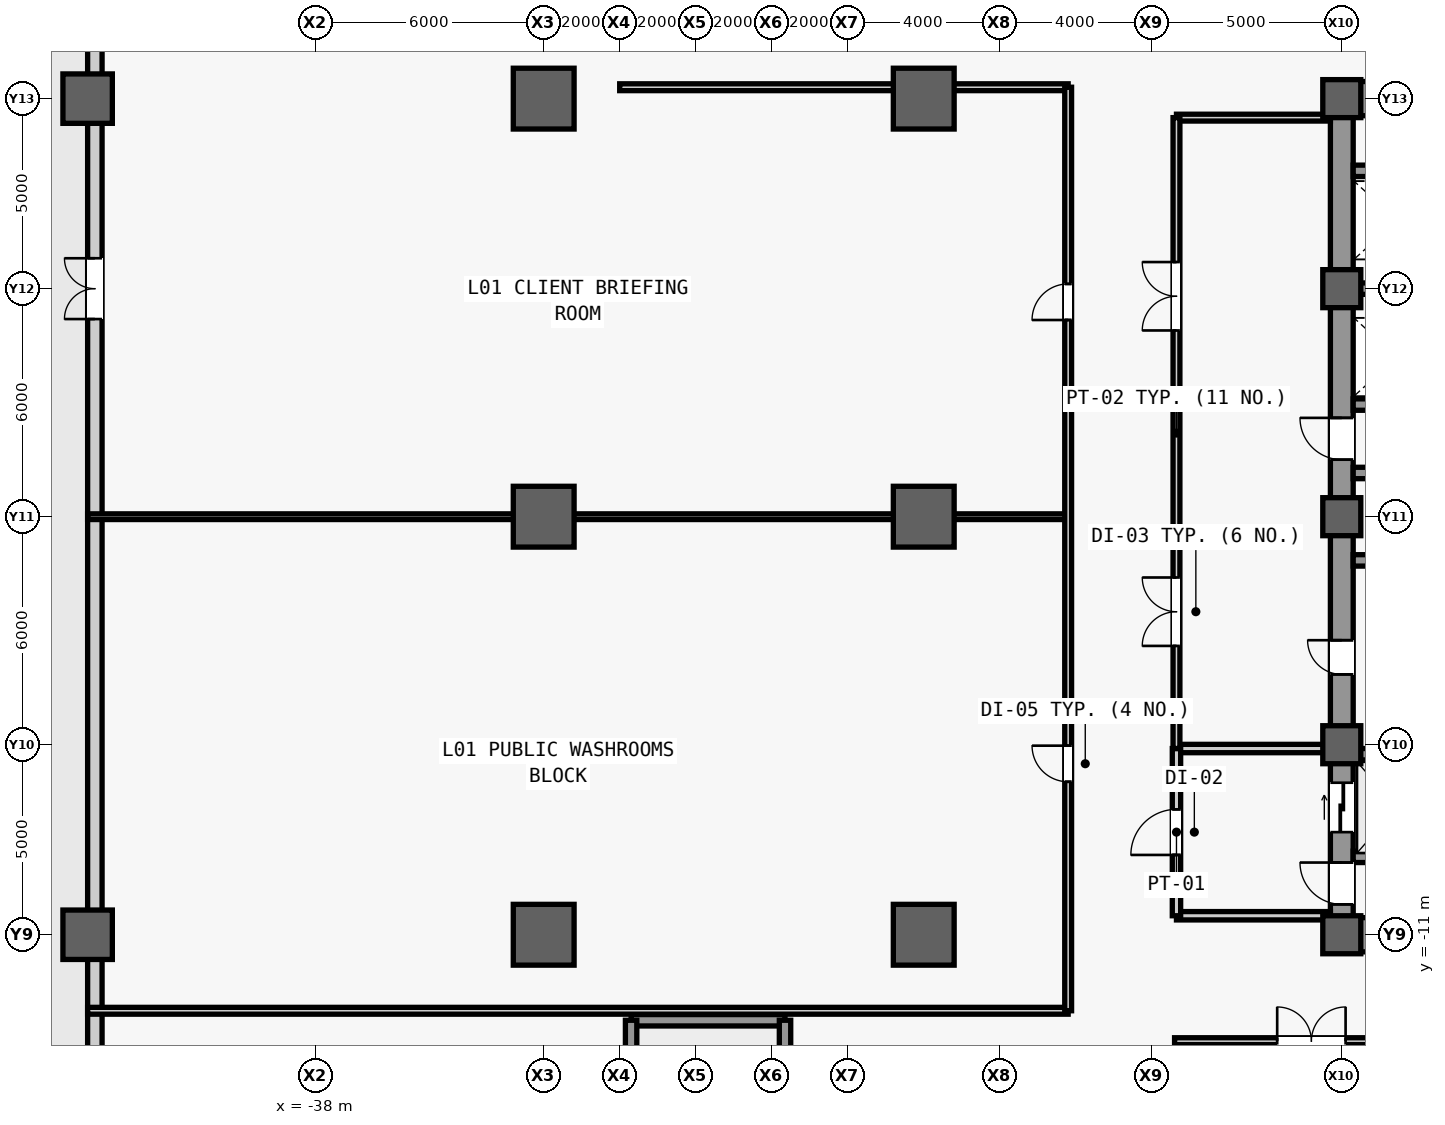
"""IFC4 building model, lengths in metres.
Left out: names, types, materials, properties, quantities, classifications, styles, units other than length and angle.
Written with IfcOpenShell. Run it as: python <this file> out.ifc"""

import sys

from ifc_helpers import new_model, si_unit, direction, frame, frame_2d, origin, origin_2d, place, context, subcontext, project, spatial, rectangle, extrude, source, transform, mapped, element, fill, save


model = new_model("IFC4")
c1 = context("Model", 3, precision=1e-05, world=origin(), true_north=direction((0.0, 1.0)))
c2 = subcontext(c1, "Body", "Model", "MODEL_VIEW")
j1 = project(units=[si_unit("LENGTHUNIT", "METRE"), si_unit("PLANEANGLEUNIT", "RADIAN")], contexts=[c1])
p1 = place(None, origin())
s1 = spatial("IfcSite", under=j1, at=p1, CompositionType="ELEMENT")
p2 = place(p1, origin())
s2 = spatial("IfcBuilding", under=s1, at=p2, CompositionType="ELEMENT")
p3 = place(p2, frame((0.0, 0.0, 6.6)))
s3 = spatial("IfcBuildingStorey", under=s2, at=p3, CompositionType="ELEMENT", Elevation=6.6)
m1 = source(origin(), c2, "Body", "SweptSolid", [
    extrude(rectangle(XDim=22.0, YDim=0.6, at=frame_2d((11.0, 0.0))), origin(), (0.0, 0.0, 1.0), 5.08),
])
p4 = place(p3, frame((-11.0, -11.0, 0.0), z_axis=(0.0, 0.0, 1.0), x_axis=(0.0, 1.0, 0.0)))
e1 = element("IfcWall", 1, at=p4, inside=s3, PredefinedType="SHEAR", context=c2, shape_type="MappedRepresentation", body=[
    mapped(m1, transform((0.0, 0.0, 0.0), scale=1.0)),
])
m2 = source(origin(), c2, "Body", "SweptSolid", [
    extrude(rectangle(XDim=1.1, YDim=2.2, at=frame_2d((0.55, 1.1))), frame((0.0, 0.31, 0.0), z_axis=(0.0, -1.0, 0.0), x_axis=(1.0, 0.0, 0.0)), (0.0, 0.0, 1.0), 0.62),
])
p5 = place(p4, frame((0.8, 0.0, 0.0)))
e2 = element("IfcOpeningElement", 2, at=p5, cuts=e1, PredefinedType="OPENING", context=c2, shape_type="MappedRepresentation", body=[
    mapped(m2, transform((0.0, 0.0, 0.0), scale=1.0)),
])
p6 = place(p4, frame((12.5, 0.0, 0.0)))
e3 = element("IfcOpeningElement", 3, at=p6, cuts=e1, PredefinedType="OPENING", context=c2, shape_type="MappedRepresentation", body=[
    mapped(m2, transform((0.0, 0.0, 0.0), scale=1.0)),
])
m3 = source(origin(), c2, "Body", "SweptSolid", [
    extrude(rectangle(XDim=0.9, YDim=2.15, at=frame_2d((0.45, 1.075))), frame((0.0, 0.31, 0.0), z_axis=(0.0, -1.0, 0.0), x_axis=(1.0, 0.0, 0.0)), (0.0, 0.0, 1.0), 0.62),
])
p7 = place(p4, frame((6.85, 0.0, 0.0)))
e4 = element("IfcOpeningElement", 4, at=p7, cuts=e1, PredefinedType="OPENING", context=c2, shape_type="MappedRepresentation", body=[
    mapped(m3, transform((0.0, 0.0, 0.0), scale=1.0)),
])
m4 = source(origin(), c2, "Body", "SweptSolid", [
    extrude(rectangle(XDim=1.3, YDim=2.3, at=frame_2d((0.65, 1.15))), frame((0.0, 0.31, 0.0), z_axis=(0.0, -1.0, 0.0), x_axis=(1.0, 0.0, 0.0)), (0.0, 0.0, 1.0), 0.62),
])
p8 = place(p4, frame((2.7, 0.0, 0.0)))
e5 = element("IfcOpeningElement", 5, at=p8, cuts=e1, PredefinedType="OPENING", context=c2, shape_type="MappedRepresentation", body=[
    mapped(m4, transform((0.0, 0.0, 0.0), scale=1.0)),
])
m5 = source(origin(), c2, "Body", "SweptSolid", [
    extrude(rectangle(XDim=5.85, YDim=0.9, at=frame_2d((2.925, 0.0))), origin(), (0.0, 0.0, 1.0), 5.08),
])
for number, where, z_axis, x_axis in (
    (6, (-10.7, -11.0, 0.0), (0.0, 0.0, 1.0), (1.0, 0.0, 0.0)),
    (7, (-10.7, 11.0, 0.0), (0.0, 0.0, 1.0), (1.0, 0.0, 0.0)),
):
    element("IfcWall", number, at=place(p3, frame(where, z_axis=z_axis, x_axis=x_axis)), inside=s3, PredefinedType="SHEAR", context=c2, shape_type="MappedRepresentation", body=[
        mapped(m5, transform((0.0, 0.0, 0.0), scale=1.0)),
    ])
m6 = source(origin(), c2, "Body", "SweptSolid", [
    extrude(rectangle(XDim=5.6, YDim=0.3, at=frame_2d((2.8, 0.0))), origin(), (0.0, 0.0, 1.0), 5.08),
])
for number, where, z_axis, x_axis in (
    (8, (-10.7, -1.15, 0.0), (0.0, 0.0, 1.0), (1.0, 0.0, 0.0)),
    (9, (-10.7, 1.15, 0.0), (0.0, 0.0, 1.0), (1.0, 0.0, 0.0)),
):
    element("IfcWall", number, at=place(p3, frame(where, z_axis=z_axis, x_axis=x_axis)), inside=s3, PredefinedType="SHEAR", context=c2, shape_type="MappedRepresentation", body=[
        mapped(m6, transform((0.0, 0.0, 0.0), scale=1.0)),
    ])
m7 = source(origin(), c2, "Body", "SweptSolid", [
    extrude(rectangle(XDim=1.3, YDim=1.3, at=origin_2d()), origin(), (0.0, 0.0, 1.0), 5.4),
])
for number, where, z_axis, x_axis in (
    (10, (-44.0, -11.0, 0.0), (0.0, 0.0, 1.0), (1.0, 0.0, 0.0)),
    (11, (-44.0, 11.0, 0.0), (0.0, 0.0, 1.0), (1.0, 0.0, 0.0)),
):
    element("IfcColumn", number, at=place(p3, frame(where, z_axis=z_axis, x_axis=x_axis)), inside=s3, PredefinedType="COLUMN", context=c2, shape_type="MappedRepresentation", body=[
        mapped(m7, transform((0.0, 0.0, 0.0), scale=1.0)),
    ])
m8 = source(origin(), c2, "Body", "SweptSolid", [
    extrude(rectangle(XDim=1.6, YDim=1.6, at=origin_2d()), origin(), (0.0, 0.0, 1.0), 5.4),
])
for number, where, z_axis, x_axis in (
    (12, (-32.0, -11.0, 0.0), (0.0, 0.0, 1.0), (1.0, 0.0, 0.0)),
    (13, (-32.0, 0.0, 0.0), (0.0, 0.0, 1.0), (1.0, 0.0, 0.0)),
    (14, (-32.0, 11.0, 0.0), (0.0, 0.0, 1.0), (1.0, 0.0, 0.0)),
    (15, (-22.0, -11.0, 0.0), (0.0, 0.0, 1.0), (1.0, 0.0, 0.0)),
    (16, (-22.0, 0.0, 0.0), (0.0, 0.0, 1.0), (1.0, 0.0, 0.0)),
    (17, (-22.0, 11.0, 0.0), (0.0, 0.0, 1.0), (1.0, 0.0, 0.0)),
):
    element("IfcColumn", number, at=place(p3, frame(where, z_axis=z_axis, x_axis=x_axis)), inside=s3, PredefinedType="COLUMN", context=c2, shape_type="MappedRepresentation", body=[
        mapped(m8, transform((0.0, 0.0, 0.0), scale=1.0)),
    ])
m9 = source(origin(), c2, "Body", "SweptSolid", [
    extrude(rectangle(XDim=1.0, YDim=1.0, at=origin_2d()), origin(), (0.0, 0.0, 1.0), 5.4),
])
for number, where, z_axis, x_axis in (
    (18, (-11.0, -11.0, 0.0), (0.0, 0.0, 1.0), (1.0, 0.0, 0.0)),
    (19, (-11.0, -6.0, 0.0), (0.0, 0.0, 1.0), (1.0, 0.0, 0.0)),
    (20, (-11.0, 0.0, 0.0), (0.0, 0.0, 1.0), (1.0, 0.0, 0.0)),
    (21, (-11.0, 6.0, 0.0), (0.0, 0.0, 1.0), (1.0, 0.0, 0.0)),
    (22, (-11.0, 11.0, 0.0), (0.0, 0.0, 1.0), (1.0, 0.0, 0.0)),
):
    element("IfcColumn", number, at=place(p3, frame(where, z_axis=z_axis, x_axis=x_axis)), inside=s3, PredefinedType="COLUMN", context=c2, shape_type="MappedRepresentation", body=[
        mapped(m9, transform((0.0, 0.0, 0.0), scale=1.0)),
    ])
m10 = source(origin(), c2, "Body", "SweptSolid", [
    extrude(rectangle(XDim=73.24, YDim=0.38, at=frame_2d((36.62, 0.0))), origin(), (0.0, 0.0, 1.0), 3.28),
])
p9 = place(p3, frame((-43.81, -36.62, 0.0), z_axis=(0.0, 0.0, 1.0), x_axis=(0.0, 1.0, 0.0)))
e23 = element("IfcWall", 23, at=p9, inside=s3, PredefinedType="STANDARD", context=c2, shape_type="MappedRepresentation", body=[
    mapped(m10, transform((0.0, 0.0, 0.0), scale=1.0)),
])
m11 = source(origin(), c2, "Body", "SweptSolid", [
    extrude(rectangle(XDim=1.6, YDim=2.25, at=frame_2d((0.8, 1.125))), frame((0.0, 0.2, 0.0), z_axis=(0.0, -1.0, 0.0), x_axis=(1.0, 0.0, 0.0)), (0.0, 0.0, 1.0), 0.4),
])
p10 = place(p9, frame((41.82, 0.0, 0.0)))
e24 = element("IfcOpeningElement", 24, at=p10, cuts=e23, PredefinedType="OPENING", context=c2, shape_type="MappedRepresentation", body=[
    mapped(m11, transform((0.0, 0.0, 0.0), scale=1.0)),
])
m12 = source(origin(), c2, "Body", "SweptSolid", [
    extrude(rectangle(XDim=2.4, YDim=2.56, at=frame_2d((1.2, 1.28))), frame((0.0, 0.2, 0.0), z_axis=(0.0, -1.0, 0.0), x_axis=(1.0, 0.0, 0.0)), (0.0, 0.0, 1.0), 0.4),
])
p11 = place(p9, frame((17.11, 0.0, 0.5)))
e25 = element("IfcOpeningElement", 25, at=p11, cuts=e23, PredefinedType="OPENING", context=c2, shape_type="MappedRepresentation", body=[
    mapped(m12, transform((0.0, 0.0, 0.0), scale=1.0)),
])
p12 = place(p9, frame((53.73, 0.0, 0.5)))
e26 = element("IfcOpeningElement", 26, at=p12, cuts=e23, PredefinedType="OPENING", context=c2, shape_type="MappedRepresentation", body=[
    mapped(m12, transform((0.0, 0.0, 0.0), scale=1.0)),
])
m13 = source(origin(), c2, "Body", "SweptSolid", [
    extrude(rectangle(XDim=2.2, YDim=0.3, at=frame_2d((1.1, 0.0))), origin(), (0.0, 0.0, 1.0), 5.08),
])
for number, where, z_axis, x_axis in (
    (27, (-10.7, -8.95, 0.0), (0.0, 0.0, 1.0), (1.0, 0.0, 0.0)),
    (28, (-10.7, -6.25, 0.0), (0.0, 0.0, 1.0), (1.0, 0.0, 0.0)),
    (29, (-10.7, 2.95, 0.0), (0.0, 0.0, 1.0), (1.0, 0.0, 0.0)),
    (30, (-10.7, 6.0, 0.0), (0.0, 0.0, 1.0), (1.0, 0.0, 0.0)),
    (31, (-10.7, 9.1, 0.0), (0.0, 0.0, 1.0), (1.0, 0.0, 0.0)),
):
    element("IfcWall", number, at=place(p3, frame(where, z_axis=z_axis, x_axis=x_axis)), inside=s3, PredefinedType="SHEAR", context=c2, shape_type="MappedRepresentation", body=[
        mapped(m13, transform((0.0, 0.0, 0.0), scale=1.0)),
    ])
m14 = source(origin(), c2, "Body", "SweptSolid", [
    extrude(rectangle(XDim=4.05, YDim=0.22, at=frame_2d((2.025, 0.0))), origin(), (0.0, 0.0, 1.0), 5.08),
])
for number, where, z_axis, x_axis in (
    (32, (-15.35, -10.5, 0.0), (0.0, 0.0, 1.0), (1.0, 0.0, 0.0)),
    (33, (-15.35, -6.1, 0.0), (0.0, 0.0, 1.0), (1.0, 0.0, 0.0)),
):
    element("IfcWall", number, at=place(p3, frame(where, z_axis=z_axis, x_axis=x_axis)), inside=s3, PredefinedType="PARTITIONING", context=c2, shape_type="MappedRepresentation", body=[
        mapped(m14, transform((0.0, 0.0, 0.0), scale=1.0)),
    ])
m15 = source(origin(), c2, "Body", "SweptSolid", [
    extrude(rectangle(XDim=4.4, YDim=0.22, at=frame_2d((2.2, 0.0))), origin(), (0.0, 0.0, 1.0), 5.08),
])
p13 = place(p3, frame((-15.35, -10.5, 0.0), z_axis=(0.0, 0.0, 1.0), x_axis=(0.0, 1.0, 0.0)))
e34 = element("IfcWall", 34, at=p13, inside=s3, PredefinedType="PARTITIONING", context=c2, shape_type="MappedRepresentation", body=[
    mapped(m15, transform((0.0, 0.0, 0.0), scale=1.0)),
])
m16 = source(origin(), c2, "Body", "SweptSolid", [
    extrude(rectangle(XDim=1.2, YDim=2.2, at=frame_2d((0.6, 1.1))), frame((0.0, 0.12, 0.0), z_axis=(0.0, -1.0, 0.0), x_axis=(1.0, 0.0, 0.0)), (0.0, 0.0, 1.0), 0.24),
])
p14 = place(p13, frame((1.6, 0.0, 0.0)))
e35 = element("IfcOpeningElement", 35, at=p14, cuts=e34, PredefinedType="OPENING", context=c2, shape_type="MappedRepresentation", body=[
    mapped(m16, transform((0.0, 0.0, 0.0), scale=1.0)),
])
m17 = source(origin(), c2, "Body", "SweptSolid", [
    extrude(rectangle(XDim=4.05, YDim=0.18, at=frame_2d((2.025, 0.0))), origin(), (0.0, 0.0, 1.0), 5.08),
])
p15 = place(p3, frame((-15.35, 10.5, 0.0), z_axis=(0.0, 0.0, 1.0), x_axis=(1.0, 0.0, 0.0)))
e36 = element("IfcWall", 36, at=p15, inside=s3, PredefinedType="PARTITIONING", context=c2, shape_type="MappedRepresentation", body=[
    mapped(m17, transform((0.0, 0.0, 0.0), scale=1.0)),
])
m18 = source(origin(), c2, "Body", "SweptSolid", [
    extrude(rectangle(XDim=16.6, YDim=0.18, at=frame_2d((8.3, 0.0))), origin(), (0.0, 0.0, 1.0), 5.08),
])
p16 = place(p3, frame((-15.35, -6.1, 0.0), z_axis=(0.0, 0.0, 1.0), x_axis=(0.0, 1.0, 0.0)))
e37 = element("IfcWall", 37, at=p16, inside=s3, PredefinedType="PARTITIONING", context=c2, shape_type="MappedRepresentation", body=[
    mapped(m18, transform((0.0, 0.0, 0.0), scale=1.0)),
])
m19 = source(origin(), c2, "Body", "SweptSolid", [
    extrude(rectangle(XDim=1.8, YDim=2.25, at=frame_2d((0.9, 1.125))), frame((0.0, 0.1, 0.0), z_axis=(0.0, -1.0, 0.0), x_axis=(1.0, 0.0, 0.0)), (0.0, 0.0, 1.0), 0.2),
])
p17 = place(p16, frame((2.7, 0.0, 0.0)))
e38 = element("IfcOpeningElement", 38, at=p17, cuts=e37, PredefinedType="OPENING", context=c2, shape_type="MappedRepresentation", body=[
    mapped(m19, transform((0.0, 0.0, 0.0), scale=1.0)),
])
p18 = place(p16, frame((11.0, 0.0, 0.0)))
e39 = element("IfcOpeningElement", 39, at=p18, cuts=e37, PredefinedType="OPENING", context=c2, shape_type="MappedRepresentation", body=[
    mapped(m19, transform((0.0, 0.0, 0.0), scale=1.0)),
])
m20 = source(origin(), c2, "Body", "SweptSolid", [
    extrude(rectangle(XDim=4.05, YDim=0.3, at=frame_2d((2.025, 0.0))), origin(), (0.0, 0.0, 1.0), 5.08),
])
p19 = place(p3, frame((-29.7, -13.25, 0.0), z_axis=(0.0, 0.0, 1.0), x_axis=(1.0, 0.0, 0.0)))
e40 = element("IfcWall", 40, at=p19, inside=s3, PredefinedType="SHEAR", context=c2, shape_type="MappedRepresentation", body=[
    mapped(m20, transform((0.0, 0.0, 0.0), scale=1.0)),
])
m21 = source(origin(), c2, "Body", "SweptSolid", [
    extrude(rectangle(XDim=10.5, YDim=0.3, at=frame_2d((5.25, 0.0))), origin(), (0.0, 0.0, 1.0), 5.08),
])
for number, where, z_axis, x_axis in (
    (41, (-29.7, -23.75, 0.0), (0.0, 0.0, 1.0), (0.0, 1.0, 0.0)),
    (42, (-25.65, -23.75, 0.0), (0.0, 0.0, 1.0), (0.0, 1.0, 0.0)),
):
    element("IfcWall", number, at=place(p3, frame(where, z_axis=z_axis, x_axis=x_axis)), inside=s3, PredefinedType="SHEAR", context=c2, shape_type="MappedRepresentation", body=[
        mapped(m21, transform((0.0, 0.0, 0.0), scale=1.0)),
    ])
m22 = source(origin(), c2, "Body", "SweptSolid", [
    extrude(rectangle(XDim=30.8, YDim=0.18, at=frame_2d((15.4, 0.0))), origin(), (0.0, 0.0, 1.0), 5.08),
])
p20 = place(p3, frame((-15.4, -13.8, 0.0), z_axis=(0.0, 0.0, 1.0), x_axis=(1.0, 0.0, 0.0)))
e43 = element("IfcWall", 43, at=p20, inside=s3, PredefinedType="PARTITIONING", context=c2, shape_type="MappedRepresentation", body=[
    mapped(m22, transform((0.0, 0.0, 0.0), scale=1.0)),
])
p21 = place(p20, frame((2.7, 0.0, 0.0)))
e44 = element("IfcOpeningElement", 44, at=p21, cuts=e43, PredefinedType="OPENING", context=c2, shape_type="MappedRepresentation", body=[
    mapped(m19, transform((0.0, 0.0, 0.0), scale=1.0)),
])
p22 = place(p20, frame((26.3, 0.0, 0.0)))
e45 = element("IfcOpeningElement", 45, at=p22, cuts=e43, PredefinedType="OPENING", context=c2, shape_type="MappedRepresentation", body=[
    mapped(m19, transform((0.0, 0.0, 0.0), scale=1.0)),
])
m23 = source(origin(), c2, "Body", "SweptSolid", [
    extrude(rectangle(XDim=11.8, YDim=0.18, at=frame_2d((5.9, 0.0))), origin(), (0.0, 0.0, 1.0), 3.28),
])
p23 = place(p3, frame((-30.0, 11.3, 0.0), z_axis=(0.0, 0.0, 1.0), x_axis=(1.0, 0.0, 0.0)))
e46 = element("IfcWall", 46, at=p23, inside=s3, PredefinedType="PARTITIONING", context=c2, shape_type="MappedRepresentation", body=[
    mapped(m23, transform((0.0, 0.0, 0.0), scale=1.0)),
])
m24 = source(origin(), c2, "Body", "SweptSolid", [
    extrude(rectangle(XDim=25.8, YDim=0.18, at=frame_2d((12.9, 0.0))), origin(), (0.0, 0.0, 1.0), 5.08),
])
p24 = place(p3, frame((-44.0, -13.0, 0.0), z_axis=(0.0, 0.0, 1.0), x_axis=(1.0, 0.0, 0.0)))
e47 = element("IfcWall", 47, at=p24, inside=s3, PredefinedType="PARTITIONING", context=c2, shape_type="MappedRepresentation", body=[
    mapped(m24, transform((0.0, 0.0, 0.0), scale=1.0)),
])
m25 = source(origin(), c2, "Body", "SweptSolid", [
    extrude(rectangle(XDim=25.8, YDim=0.15, at=frame_2d((12.9, 0.0))), origin(), (0.0, 0.0, 1.0), 3.28),
])
p25 = place(p3, frame((-44.0, 0.0, 0.0), z_axis=(0.0, 0.0, 1.0), x_axis=(1.0, 0.0, 0.0)))
e48 = element("IfcWall", 48, at=p25, inside=s3, PredefinedType="PARTITIONING", context=c2, shape_type="MappedRepresentation", body=[
    mapped(m25, transform((0.0, 0.0, 0.0), scale=1.0)),
])
m26 = source(origin(), c2, "Body", "SweptSolid", [
    extrude(rectangle(XDim=24.3, YDim=0.18, at=frame_2d((12.15, 0.0))), origin(), (0.0, 0.0, 1.0), 5.08),
])
p26 = place(p3, frame((-18.2, -13.0, 0.0), z_axis=(0.0, 0.0, 1.0), x_axis=(0.0, 1.0, 0.0)))
e49 = element("IfcWall", 49, at=p26, inside=s3, PredefinedType="PARTITIONING", context=c2, shape_type="MappedRepresentation", body=[
    mapped(m26, transform((0.0, 0.0, 0.0), scale=1.0)),
])
m27 = source(origin(), c2, "Body", "SweptSolid", [
    extrude(rectangle(XDim=0.95, YDim=2.15, at=frame_2d((0.475, 1.075))), frame((0.0, 0.1, 0.0), z_axis=(0.0, -1.0, 0.0), x_axis=(1.0, 0.0, 0.0)), (0.0, 0.0, 1.0), 0.2),
])
p27 = place(p26, frame((6.025, 0.0, 0.0)))
e50 = element("IfcOpeningElement", 50, at=p27, cuts=e49, PredefinedType="OPENING", context=c2, shape_type="MappedRepresentation", body=[
    mapped(m27, transform((0.0, 0.0, 0.0), scale=1.0)),
])
p28 = place(p26, frame((18.175, 0.0, 0.0)))
e51 = element("IfcOpeningElement", 51, at=p28, cuts=e49, PredefinedType="OPENING", context=c2, shape_type="MappedRepresentation", body=[
    mapped(m27, transform((0.0, 0.0, 0.0), scale=1.0)),
])
m28 = source(origin(), c2, "Body", "SweptSolid", [
    extrude(rectangle(XDim=1.6, YDim=2.25, at=frame_2d((0.8, 1.125))), frame((0.0, 0.025, 0.0), z_axis=(0.0, -1.0, 0.0), x_axis=(1.0, 0.0, 0.0)), (0.0, 0.0, 1.0), 0.05),
])
p29 = place(p10, origin())
e52 = element("IfcDoor", 52, at=p29, inside=s3, OperationType="DOUBLE_DOOR_SINGLE_SWING", PredefinedType="DOOR", context=c2, shape_type="MappedRepresentation", body=[
    mapped(m28, transform((0.0, 0.0, 0.0), scale=1.0)),
])
fill(e24, e52)
m29 = source(origin(), c2, "Body", "SweptSolid", [
    extrude(rectangle(XDim=1.1, YDim=2.2, at=frame_2d((0.55, 1.1))), frame((0.0, 0.025, 0.0), z_axis=(0.0, -1.0, 0.0), x_axis=(1.0, 0.0, 0.0)), (0.0, 0.0, 1.0), 0.05),
])
p30 = place(p5, origin())
e53 = element("IfcDoor", 53, at=p30, inside=s3, OperationType="SINGLE_SWING_RIGHT", PredefinedType="DOOR", context=c2, shape_type="MappedRepresentation", body=[
    mapped(m29, transform((0.0, 0.0, 0.0), scale=1.0)),
])
fill(e2, e53)
p31 = place(p6, origin())
e54 = element("IfcDoor", 54, at=p31, inside=s3, OperationType="SINGLE_SWING_RIGHT", PredefinedType="DOOR", context=c2, shape_type="MappedRepresentation", body=[
    mapped(m29, transform((0.0, 0.0, 0.0), scale=1.0)),
])
fill(e3, e54)
m30 = source(origin(), c2, "Body", "SweptSolid", [
    extrude(rectangle(XDim=0.9, YDim=2.15, at=frame_2d((0.45, 1.075))), frame((0.0, 0.025, 0.0), z_axis=(0.0, -1.0, 0.0), x_axis=(1.0, 0.0, 0.0)), (0.0, 0.0, 1.0), 0.05),
])
p32 = place(p7, origin())
e55 = element("IfcDoor", 55, at=p32, inside=s3, OperationType="SINGLE_SWING_RIGHT", PredefinedType="DOOR", context=c2, shape_type="MappedRepresentation", body=[
    mapped(m30, transform((0.0, 0.0, 0.0), scale=1.0)),
])
fill(e4, e55)
m31 = source(origin(), c2, "Body", "SweptSolid", [
    extrude(rectangle(XDim=1.2, YDim=2.2, at=frame_2d((0.6, 1.1))), frame((0.0, 0.025, 0.0), z_axis=(0.0, -1.0, 0.0), x_axis=(1.0, 0.0, 0.0)), (0.0, 0.0, 1.0), 0.05),
])
p33 = place(p14, origin())
e56 = element("IfcDoor", 56, at=p33, inside=s3, OperationType="SINGLE_SWING_LEFT", PredefinedType="DOOR", context=c2, shape_type="MappedRepresentation", body=[
    mapped(m31, transform((0.0, 0.0, 0.0), scale=1.0)),
])
fill(e35, e56)
m32 = source(origin(), c2, "Body", "SweptSolid", [
    extrude(rectangle(XDim=1.8, YDim=2.25, at=frame_2d((0.9, 1.125))), frame((0.0, 0.025, 0.0), z_axis=(0.0, -1.0, 0.0), x_axis=(1.0, 0.0, 0.0)), (0.0, 0.0, 1.0), 0.05),
])
p34 = place(p17, origin())
e57 = element("IfcDoor", 57, at=p34, inside=s3, OperationType="SINGLE_SWING_LEFT", PredefinedType="DOOR", context=c2, shape_type="MappedRepresentation", body=[
    mapped(m32, transform((0.0, 0.0, 0.0), scale=1.0)),
])
fill(e38, e57)
p35 = place(p18, origin())
e58 = element("IfcDoor", 58, at=p35, inside=s3, OperationType="SINGLE_SWING_RIGHT", PredefinedType="DOOR", context=c2, shape_type="MappedRepresentation", body=[
    mapped(m32, transform((0.0, 0.0, 0.0), scale=1.0)),
])
fill(e39, e58)
p36 = place(p21, origin())
e59 = element("IfcDoor", 59, at=p36, inside=s3, OperationType="SINGLE_SWING_LEFT", PredefinedType="DOOR", context=c2, shape_type="MappedRepresentation", body=[
    mapped(m32, transform((0.0, 0.0, 0.0), scale=1.0)),
])
fill(e44, e59)
m33 = source(origin(), c2, "Body", "SweptSolid", [
    extrude(rectangle(XDim=0.95, YDim=2.15, at=frame_2d((0.475, 1.075))), frame((0.0, 0.025, 0.0), z_axis=(0.0, -1.0, 0.0), x_axis=(1.0, 0.0, 0.0)), (0.0, 0.0, 1.0), 0.05),
])
p37 = place(p27, origin())
e60 = element("IfcDoor", 60, at=p37, inside=s3, OperationType="SINGLE_SWING_RIGHT", PredefinedType="DOOR", context=c2, shape_type="MappedRepresentation", body=[
    mapped(m33, transform((0.0, 0.0, 0.0), scale=1.0)),
])
fill(e50, e60)
p38 = place(p28, origin())
e61 = element("IfcDoor", 61, at=p38, inside=s3, OperationType="SINGLE_SWING_LEFT", PredefinedType="DOOR", context=c2, shape_type="MappedRepresentation", body=[
    mapped(m33, transform((0.0, 0.0, 0.0), scale=1.0)),
])
fill(e51, e61)
m34 = source(origin(), c2, "Body", "SweptSolid", [
    extrude(rectangle(XDim=1.3, YDim=2.3, at=frame_2d((0.65, 1.15))), frame((0.0, 0.025, 0.0), z_axis=(0.0, -1.0, 0.0), x_axis=(1.0, 0.0, 0.0)), (0.0, 0.0, 1.0), 0.05),
])
p39 = place(p8, origin())
e62 = element("IfcDoor", 62, at=p39, inside=s3, OperationType="SLIDING_TO_LEFT", PredefinedType="DOOR", context=c2, shape_type="MappedRepresentation", body=[
    mapped(m34, transform((0.0, 0.0, 0.0), scale=1.0)),
])
fill(e5, e62)
save(model, sys.argv[1])
